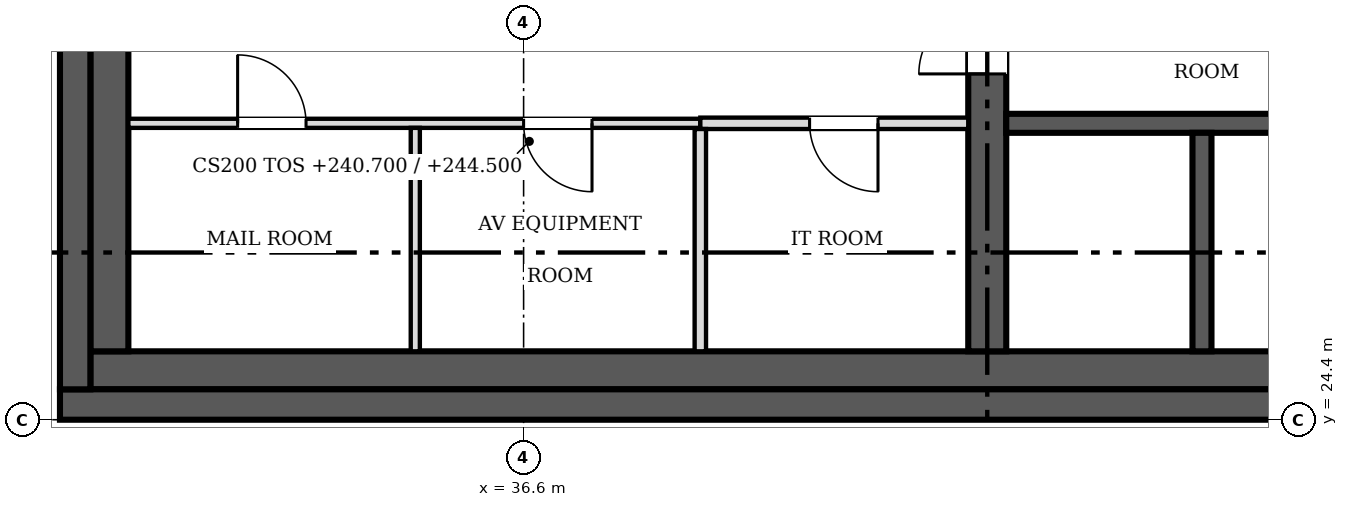
"""IFC4 building model, lengths in metres.
Left out: names, types, materials, properties, quantities, classifications, styles, units other than length and angle.
Written with IfcOpenShell. Run it as: python <this file> out.ifc"""

import sys

from ifc_helpers import new_model, si_unit, direction, frame, frame_2d, origin, place, context, subcontext, project, spatial, rectangle, extrude, source, transform, mapped, element, fill, save


model = new_model("IFC4")
c1 = context("Model", 3, precision=1e-05, world=origin(), true_north=direction((0.0, 1.0)))
c2 = subcontext(c1, "Body", "Model", "MODEL_VIEW")
j1 = project(units=[si_unit("LENGTHUNIT", "METRE"), si_unit("PLANEANGLEUNIT", "RADIAN")], contexts=[c1])
p1 = place(None, origin())
s1 = spatial("IfcSite", under=j1, at=p1, CompositionType="ELEMENT")
p2 = place(p1, origin())
s2 = spatial("IfcBuilding", under=s1, at=p2, CompositionType="ELEMENT")
p3 = place(p2, frame((0.0, 0.0, 240.7)))
s3 = spatial("IfcBuildingStorey", under=s2, at=p3, CompositionType="ELEMENT", Elevation=240.7)
p4 = place(p3, frame((54.9, 24.6, 0.0), z_axis=(0.0, 0.0, 1.0), x_axis=(-1.0, 0.0, 0.0)))
e1 = element("IfcWall", 1, at=p4, inside=s3, PredefinedType="SHEAR", context=c2, shape_type="SweptSolid", body=[
    extrude(rectangle(XDim=24.4, YDim=0.4, at=frame_2d((12.2, 0.0))), origin(), (0.0, 0.0, 1.0), 3.8),
])
m1 = source(origin(), c2, "Body", "SweptSolid", [
    extrude(rectangle(XDim=1.2, YDim=2.1, at=frame_2d((0.6, 1.05))), frame((0.0, 0.21, 0.0), z_axis=(0.0, -1.0, 0.0), x_axis=(1.0, 0.0, 0.0)), (0.0, 0.0, 1.0), 0.42),
])
p5 = place(p4, frame((1.5, 0.0, 0.0)))
e2 = element("IfcOpeningElement", 2, at=p5, cuts=e1, PredefinedType="OPENING", context=c2, shape_type="MappedRepresentation", body=[
    mapped(m1, transform((0.0, 0.0, 0.0), scale=1.0)),
])
p6 = place(p3, frame((30.7, 24.8, 0.0), z_axis=(0.0, 0.0, 1.0), x_axis=(0.0, 1.0, 0.0)))
e3 = element("IfcWall", 3, at=p6, inside=s3, PredefinedType="SHEAR", context=c2, shape_type="SweptSolid", body=[
    extrude(rectangle(XDim=23.6, YDim=0.4, at=frame_2d((11.8, 0.0))), origin(), (0.0, 0.0, 1.0), 3.8),
])
m2 = source(origin(), c2, "Body", "SweptSolid", [
    extrude(rectangle(XDim=2.1, YDim=2.4, at=frame_2d((1.05, 1.2))), frame((0.0, 0.21, 0.0), z_axis=(0.0, -1.0, 0.0), x_axis=(1.0, 0.0, 0.0)), (0.0, 0.0, 1.0), 0.42),
])
p7 = place(p6, frame((5.0, 0.0, 0.0)))
e4 = element("IfcOpeningElement", 4, at=p7, cuts=e3, PredefinedType="OPENING", context=c2, shape_type="MappedRepresentation", body=[
    mapped(m2, transform((0.0, 0.0, 0.0), scale=1.0)),
])
p8 = place(p6, frame((16.5, 0.0, 0.0)))
e5 = element("IfcOpeningElement", 5, at=p8, cuts=e3, PredefinedType="OPENING", context=c2, shape_type="MappedRepresentation", body=[
    mapped(m2, transform((0.0, 0.0, 0.0), scale=1.0)),
])
p9 = place(p3, frame((30.9, 25.05, 0.0), z_axis=(0.0, 0.0, 1.0), x_axis=(1.0, 0.0, 0.0)))
e6 = element("IfcWall", 6, at=p9, inside=s3, PredefinedType="SOLIDWALL", context=c2, shape_type="SweptSolid", body=[
    extrude(rectangle(XDim=21.3, YDim=0.5, at=frame_2d((10.65, 0.0))), origin(), (0.0, 0.0, 1.0), 3.8),
])
p10 = place(p3, frame((31.15, 25.3, 0.0), z_axis=(0.0, 0.0, 1.0), x_axis=(0.0, 1.0, 0.0)))
e7 = element("IfcWall", 7, at=p10, inside=s3, PredefinedType="SOLIDWALL", context=c2, shape_type="SweptSolid", body=[
    extrude(rectangle(XDim=4.5, YDim=0.5, at=frame_2d((2.25, 0.0))), origin(), (0.0, 0.0, 1.0), 3.8),
])
p11 = place(p3, frame((42.7, 36.35, 0.0), z_axis=(0.0, 0.0, 1.0), x_axis=(0.0, -1.0, 0.0)))
e8 = element("IfcWall", 8, at=p11, inside=s3, PredefinedType="SHEAR", context=c2, shape_type="SweptSolid", body=[
    extrude(rectangle(XDim=11.05, YDim=0.5, at=frame_2d((5.525, 0.0))), origin(), (0.0, 0.0, 1.0), 3.8),
])
m3 = source(origin(), c2, "Body", "SweptSolid", [
    extrude(rectangle(XDim=0.9, YDim=2.1, at=frame_2d((0.45, 1.05))), frame((0.0, 0.26, 0.0), z_axis=(0.0, -1.0, 0.0), x_axis=(1.0, 0.0, 0.0)), (0.0, 0.0, 1.0), 0.52),
])
p12 = place(p11, frame((6.5, 0.0, 0.0)))
e9 = element("IfcOpeningElement", 9, at=p12, cuts=e8, PredefinedType="OPENING", context=c2, shape_type="MappedRepresentation", body=[
    mapped(m3, transform((0.0, 0.0, 0.0), scale=1.0)),
])
m4 = source(origin(), c2, "Body", "SweptSolid", [
    extrude(rectangle(XDim=1.1, YDim=2.1, at=frame_2d((0.55, 1.05))), frame((0.0, 0.26, 0.0), z_axis=(0.0, -1.0, 0.0), x_axis=(1.0, 0.0, 0.0)), (0.0, 0.0, 1.0), 0.52),
])
p13 = place(p11, frame((3.8, 0.0, 0.0)))
e10 = element("IfcOpeningElement", 10, at=p13, cuts=e8, PredefinedType="OPENING", context=c2, shape_type="MappedRepresentation", body=[
    mapped(m4, transform((0.0, 0.0, 0.0), scale=1.0)),
])
p14 = place(p3, frame((42.95, 28.3, 0.0), z_axis=(0.0, 0.0, 1.0), x_axis=(1.0, 0.0, 0.0)))
e11 = element("IfcWall", 11, at=p14, inside=s3, PredefinedType="SOLIDWALL", context=c2, shape_type="SweptSolid", body=[
    extrude(rectangle(XDim=5.275, YDim=0.25, at=frame_2d((2.638, 0.0))), origin(), (0.0, 0.0, 1.0), 3.8),
])
p15 = place(p3, frame((45.525, 25.3, 0.0), z_axis=(0.0, 0.0, 1.0), x_axis=(0.0, 1.0, 0.0)))
e12 = element("IfcWall", 12, at=p15, inside=s3, PredefinedType="SOLIDWALL", context=c2, shape_type="SweptSolid", body=[
    extrude(rectangle(XDim=2.875, YDim=0.25, at=frame_2d((1.438, 0.0))), origin(), (0.0, 0.0, 1.0), 3.8),
])
p16 = place(p3, frame((38.925, 28.3, 0.0), z_axis=(0.0, 0.0, 1.0), x_axis=(-1.0, 0.0, 0.0)))
e13 = element("IfcWall", 13, at=p16, inside=s3, PredefinedType="PARTITIONING", context=c2, shape_type="SweptSolid", body=[
    extrude(rectangle(XDim=7.525, YDim=0.12, at=frame_2d((3.763, 0.0))), origin(), (0.0, 0.0, 1.0), 3.6),
])
m5 = source(origin(), c2, "Body", "SweptSolid", [
    extrude(rectangle(XDim=0.9, YDim=2.1, at=frame_2d((0.45, 1.05))), frame((0.0, 0.07, 0.0), z_axis=(0.0, -1.0, 0.0), x_axis=(1.0, 0.0, 0.0)), (0.0, 0.0, 1.0), 0.14),
])
p17 = place(p16, frame((5.188, 0.0, 0.0)))
e14 = element("IfcOpeningElement", 14, at=p17, cuts=e13, PredefinedType="OPENING", context=c2, shape_type="MappedRepresentation", body=[
    mapped(m5, transform((0.0, 0.0, 0.0), scale=1.0)),
])
p18 = place(p16, frame((1.425, 0.0, 0.0)))
e15 = element("IfcOpeningElement", 15, at=p18, cuts=e13, PredefinedType="OPENING", context=c2, shape_type="MappedRepresentation", body=[
    mapped(m5, transform((0.0, 0.0, 0.0), scale=1.0)),
])
p19 = place(p3, frame((42.45, 28.3, 0.0), z_axis=(0.0, 0.0, 1.0), x_axis=(-1.0, 0.0, 0.0)))
e16 = element("IfcWall", 16, at=p19, inside=s3, PredefinedType="PARTITIONING", context=c2, shape_type="SweptSolid", body=[
    extrude(rectangle(XDim=3.525, YDim=0.15, at=frame_2d((1.762, 0.0))), origin(), (0.0, 0.0, 1.0), 3.6),
])
m6 = source(origin(), c2, "Body", "SweptSolid", [
    extrude(rectangle(XDim=0.9, YDim=2.1, at=frame_2d((0.45, 1.05))), frame((0.0, 0.085, 0.0), z_axis=(0.0, -1.0, 0.0), x_axis=(1.0, 0.0, 0.0)), (0.0, 0.0, 1.0), 0.17),
])
p20 = place(p19, frame((1.188, 0.0, 0.0)))
e17 = element("IfcOpeningElement", 17, at=p20, cuts=e16, PredefinedType="OPENING", context=c2, shape_type="MappedRepresentation", body=[
    mapped(m6, transform((0.0, 0.0, 0.0), scale=1.0)),
])
p21 = place(p3, frame((35.175, 25.3, 0.0), z_axis=(0.0, 0.0, 1.0), x_axis=(0.0, 1.0, 0.0)))
e18 = element("IfcWall", 18, at=p21, inside=s3, PredefinedType="PARTITIONING", context=c2, shape_type="SweptSolid", body=[
    extrude(rectangle(XDim=2.94, YDim=0.12, at=frame_2d((1.47, 0.0))), origin(), (0.0, 0.0, 1.0), 3.6),
])
p22 = place(p3, frame((38.925, 25.3, 0.0), z_axis=(0.0, 0.0, 1.0), x_axis=(0.0, 1.0, 0.0)))
e19 = element("IfcWall", 19, at=p22, inside=s3, PredefinedType="PARTITIONING", context=c2, shape_type="SweptSolid", body=[
    extrude(rectangle(XDim=2.925, YDim=0.15, at=frame_2d((1.462, 0.0))), origin(), (0.0, 0.0, 1.0), 3.6),
])
m7 = source(origin(), c2, "Body", "SweptSolid", [
    extrude(rectangle(XDim=0.9, YDim=2.1, at=frame_2d((0.45, 1.05))), frame((0.0, 0.025, 0.0), z_axis=(0.0, -1.0, 0.0), x_axis=(1.0, 0.0, 0.0)), (0.0, 0.0, 1.0), 0.05),
])
p23 = place(p12, origin())
e20 = element("IfcDoor", 20, at=p23, inside=s3, OperationType="SINGLE_SWING_RIGHT", PredefinedType="DOOR", context=c2, shape_type="MappedRepresentation", body=[
    mapped(m7, transform((0.0, 0.0, 0.0), scale=1.0)),
])
fill(e9, e20)
p24 = place(p17, origin())
e21 = element("IfcDoor", 21, at=p24, inside=s3, OperationType="SINGLE_SWING_RIGHT", PredefinedType="DOOR", context=c2, shape_type="MappedRepresentation", body=[
    mapped(m7, transform((0.0, 0.0, 0.0), scale=1.0)),
])
fill(e14, e21)
p25 = place(p18, origin())
e22 = element("IfcDoor", 22, at=p25, inside=s3, OperationType="SINGLE_SWING_LEFT", PredefinedType="DOOR", context=c2, shape_type="MappedRepresentation", body=[
    mapped(m7, transform((0.0, 0.0, 0.0), scale=1.0)),
])
fill(e15, e22)
p26 = place(p20, origin())
e23 = element("IfcDoor", 23, at=p26, inside=s3, OperationType="SINGLE_SWING_LEFT", PredefinedType="DOOR", context=c2, shape_type="MappedRepresentation", body=[
    mapped(m7, transform((0.0, 0.0, 0.0), scale=1.0)),
])
fill(e17, e23)
save(model, sys.argv[1])
